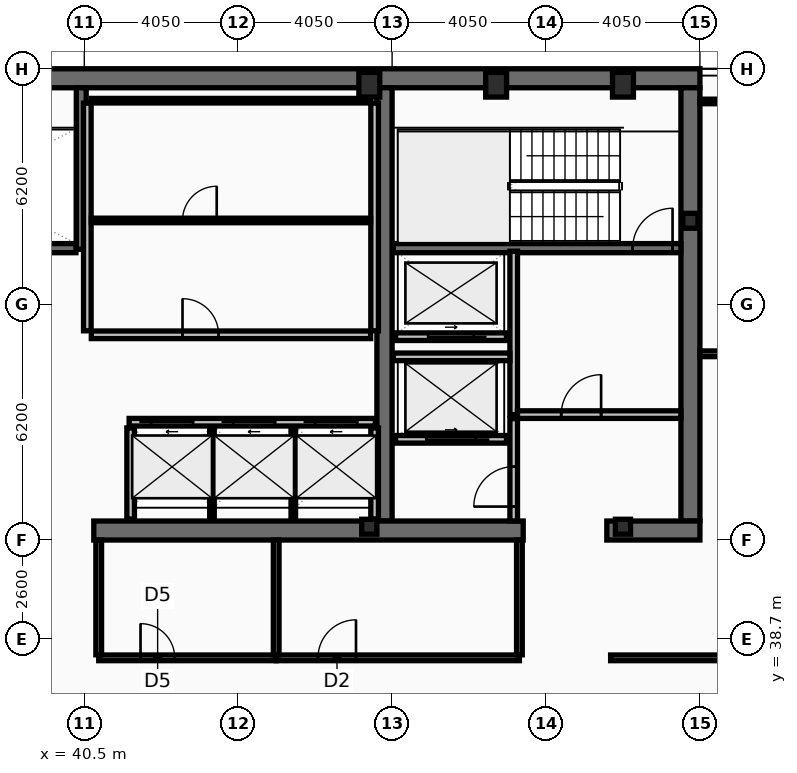
"""IFC4 building model, lengths in metres.
Left out: names, types, materials, properties, quantities, classifications, styles, units other than length and angle.
Written with IfcOpenShell. Run it as: python <this file> out.ifc"""

import sys

from ifc_helpers import new_model, si_unit, direction, frame, frame_2d, origin, origin_2d, place, context, subcontext, project, spatial, rectangle, hollow_rectangle, i_section, extrude, element, fill, save


model = new_model("IFC4")
c1 = context("Model", 3, precision=1e-05, world=origin(), true_north=direction((0.0, 1.0)))
c2 = subcontext(c1, "Body", "Model", "MODEL_VIEW")
j1 = project(units=[si_unit("LENGTHUNIT", "METRE"), si_unit("PLANEANGLEUNIT", "RADIAN")], contexts=[c1])
p1 = place(None, origin())
s1 = spatial("IfcSite", under=j1, at=p1, CompositionType="ELEMENT")
p2 = place(p1, origin())
s2 = spatial("IfcBuilding", under=s1, at=p2, CompositionType="ELEMENT")
p3 = place(p2, frame((0.0, 0.0, 347.0)))
s3 = spatial("IfcBuildingStorey", under=s2, at=p3, CompositionType="ELEMENT", Elevation=347.0)
p4 = place(p3, frame((16.2, 53.45, 0.0), z_axis=(0.0, 0.0, 1.0), x_axis=(1.0, 0.0, 0.0)))
e1 = element("IfcWall", 1, at=p4, inside=s3, PredefinedType="SHEAR", context=c2, shape_type="SweptSolid", body=[
    extrude(rectangle(XDim=40.5, YDim=0.5, at=frame_2d((20.25, 0.0))), origin(), (0.0, 0.0, 1.0), 3.38),
])
p5 = place(p3, frame((56.45, 53.2, 0.0), z_axis=(0.0, 0.0, 1.0), x_axis=(0.0, -1.0, 0.0)))
e2 = element("IfcWall", 2, at=p5, inside=s3, PredefinedType="SHEAR", context=c2, shape_type="SweptSolid", body=[
    extrude(rectangle(XDim=11.4, YDim=0.5, at=frame_2d((5.7, 0.0))), origin(), (0.0, 0.0, 1.0), 3.38),
])
p6 = place(p3, frame((48.4, 41.8, 0.0), z_axis=(0.0, 0.0, 1.0), x_axis=(0.0, 1.0, 0.0)))
e3 = element("IfcWall", 3, at=p6, inside=s3, PredefinedType="SHEAR", context=c2, shape_type="SweptSolid", body=[
    extrude(rectangle(XDim=11.4, YDim=0.4, at=frame_2d((5.7, 0.0))), origin(), (0.0, 0.0, 1.0), 3.38),
])
p7 = place(p3, frame((52.05, 41.55, 0.0), z_axis=(0.0, 0.0, 1.0), x_axis=(-1.0, 0.0, 0.0)))
e4 = element("IfcWall", 4, at=p7, inside=s3, PredefinedType="SHEAR", context=c2, shape_type="SweptSolid", body=[
    extrude(rectangle(XDim=11.3, YDim=0.5, at=frame_2d((5.65, 0.0))), origin(), (0.0, 0.0, 1.0), 3.38),
])
p8 = place(p3, frame((56.7, 41.55, 0.0), z_axis=(0.0, 0.0, 1.0), x_axis=(-1.0, 0.0, 0.0)))
e5 = element("IfcWall", 5, at=p8, inside=s3, PredefinedType="SHEAR", context=c2, shape_type="SweptSolid", body=[
    extrude(rectangle(XDim=2.45, YDim=0.5, at=frame_2d((1.225, 0.0))), origin(), (0.0, 0.0, 1.0), 3.38),
])
p9 = place(p3, frame((40.42, 48.95, 0.0), z_axis=(0.0, 0.0, 1.0), x_axis=(0.0, 1.0, 0.0)))
e6 = element("IfcWall", 6, at=p9, inside=s3, PredefinedType="SHEAR", context=c2, shape_type="SweptSolid", body=[
    extrude(rectangle(XDim=4.25, YDim=0.26, at=frame_2d((2.125, 0.0))), origin(), (0.0, 0.0, 1.0), 3.38),
])
p10 = place(p3, frame((48.63, 48.98, 0.0), z_axis=(0.0, 0.0, 1.0), x_axis=(1.0, 0.0, 0.0)))
e7 = element("IfcWall", 7, at=p10, inside=s3, PredefinedType="SHEAR", context=c2, shape_type="SweptSolid", body=[
    extrude(rectangle(XDim=7.57, YDim=0.24, at=frame_2d((3.785, 0.0))), origin(), (0.0, 0.0, 1.0), 3.38),
])
p11 = place(p10, frame((6.3, 0.0, 0.0)))
e8 = element("IfcOpeningElement", 8, at=p11, cuts=e7, PredefinedType="OPENING", context=c2, shape_type="SweptSolid", body=[
    extrude(rectangle(XDim=1.05, YDim=2.15, at=frame_2d((0.525, 1.075))), frame((0.0, 0.13, 0.0), z_axis=(0.0, -1.0, 0.0), x_axis=(1.0, 0.0, 0.0)), (0.0, 0.0, 1.0), 0.26),
])
p12 = place(p3, frame((32.72, 48.98, 0.0), z_axis=(0.0, 0.0, 1.0), x_axis=(1.0, 0.0, 0.0)))
e9 = element("IfcWall", 9, at=p12, inside=s3, PredefinedType="SHEAR", context=c2, shape_type="SweptSolid", body=[
    extrude(rectangle(XDim=7.56, YDim=0.24, at=frame_2d((3.78, 0.0))), origin(), (0.0, 0.0, 1.0), 3.38),
])
p13 = place(p12, frame((0.22, 0.0, 0.0)))
e10 = element("IfcOpeningElement", 10, at=p13, cuts=e9, PredefinedType="OPENING", context=c2, shape_type="SweptSolid", body=[
    extrude(rectangle(XDim=1.05, YDim=2.15, at=frame_2d((0.525, 1.075))), frame((0.0, 0.13, 0.0), z_axis=(0.0, -1.0, 0.0), x_axis=(1.0, 0.0, 0.0)), (0.0, 0.0, 1.0), 0.26),
])
for number, where, z_axis, x_axis in (
    (11, (48.0, 53.28, 0.0), (0.0, 0.0, 1.0), (1.0, 0.0, 0.0)),
    (12, (51.337, 53.28, 0.0), (0.0, 0.0, 1.0), (1.0, 0.0, 0.0)),
    (13, (54.675, 53.28, 0.0), (0.0, 0.0, 1.0), (1.0, 0.0, 0.0)),
):
    element("IfcColumn", number, at=place(p3, frame(where, z_axis=z_axis, x_axis=x_axis)), inside=s3, PredefinedType="COLUMN", context=c2, shape_type="SweptSolid", body=[
        extrude(hollow_rectangle(XDim=0.55, YDim=0.65, WallThickness=0.04, at=origin_2d()), origin(), (0.0, 0.0, 1.0), 3.6),
    ])
for number, where, z_axis, x_axis in (
    (14, (56.45, 49.7, 0.0), (0.0, 0.0, 1.0), (1.0, 0.0, 0.0)),
    (15, (48.0, 41.65, 0.0), (0.0, 0.0, 1.0), (1.0, 0.0, 0.0)),
    (16, (54.675, 41.65, 0.0), (0.0, 0.0, 1.0), (1.0, 0.0, 0.0)),
):
    element("IfcColumn", number, at=place(p3, frame(where, z_axis=z_axis, x_axis=x_axis)), inside=s3, PredefinedType="COLUMN", context=c2, shape_type="SweptSolid", body=[
        extrude(i_section(OverallWidth=0.399, OverallDepth=0.393, WebThickness=0.023, FlangeThickness=0.037, at=origin_2d()), origin(), (0.0, 0.0, 1.0), 3.6),
    ])
p14 = place(p3, frame((41.68, 44.4, 0.0), z_axis=(0.0, 0.0, 1.0), x_axis=(1.0, 0.0, 0.0)))
e17 = element("IfcWall", 17, at=p14, inside=s3, PredefinedType="PARTITIONING", context=c2, shape_type="SweptSolid", body=[
    extrude(rectangle(XDim=6.48, YDim=0.2, at=frame_2d((3.24, 0.0))), origin(), (0.0, 0.0, 1.0), 3.38),
])
p15 = place(p14, frame((0.58, 0.0, 0.0)))
e18 = element("IfcOpeningElement", 18, at=p15, cuts=e17, PredefinedType="OPENING", context=c2, shape_type="SweptSolid", body=[
    extrude(rectangle(XDim=1.1, YDim=2.18, at=frame_2d((0.55, 1.09))), frame((0.0, 0.11, 0.0), z_axis=(0.0, -1.0, 0.0), x_axis=(1.0, 0.0, 0.0)), (0.0, 0.0, 1.0), 0.22),
])
p16 = place(p14, frame((2.74, 0.0, 0.0)))
e19 = element("IfcOpeningElement", 19, at=p16, cuts=e17, PredefinedType="OPENING", context=c2, shape_type="SweptSolid", body=[
    extrude(rectangle(XDim=1.1, YDim=2.18, at=frame_2d((0.55, 1.09))), frame((0.0, 0.11, 0.0), z_axis=(0.0, -1.0, 0.0), x_axis=(1.0, 0.0, 0.0)), (0.0, 0.0, 1.0), 0.22),
])
p17 = place(p14, frame((4.9, 0.0, 0.0)))
e20 = element("IfcOpeningElement", 20, at=p17, cuts=e17, PredefinedType="OPENING", context=c2, shape_type="SweptSolid", body=[
    extrude(rectangle(XDim=1.1, YDim=2.18, at=frame_2d((0.55, 1.09))), frame((0.0, 0.11, 0.0), z_axis=(0.0, -1.0, 0.0), x_axis=(1.0, 0.0, 0.0)), (0.0, 0.0, 1.0), 0.22),
])
p18 = place(p3, frame((51.61, 43.95, 0.0), z_axis=(0.0, 0.0, 1.0), x_axis=(-1.0, 0.0, 0.0)))
e21 = element("IfcWall", 21, at=p18, inside=s3, PredefinedType="PARTITIONING", context=c2, shape_type="SweptSolid", body=[
    extrude(rectangle(XDim=2.92, YDim=0.2, at=frame_2d((1.46, 0.0))), origin(), (0.0, 0.0, 1.0), 3.38),
])
p19 = place(p18, frame((0.81, 0.0, 0.0)))
e22 = element("IfcOpeningElement", 22, at=p19, cuts=e21, PredefinedType="OPENING", context=c2, shape_type="SweptSolid", body=[
    extrude(rectangle(XDim=1.3, YDim=2.18, at=frame_2d((0.65, 1.09))), frame((0.0, 0.11, 0.0), z_axis=(0.0, -1.0, 0.0), x_axis=(1.0, 0.0, 0.0)), (0.0, 0.0, 1.0), 0.22),
])
p20 = place(p3, frame((51.61, 46.65, 0.0), z_axis=(0.0, 0.0, 1.0), x_axis=(-1.0, 0.0, 0.0)))
e23 = element("IfcWall", 23, at=p20, inside=s3, PredefinedType="PARTITIONING", context=c2, shape_type="SweptSolid", body=[
    extrude(rectangle(XDim=2.92, YDim=0.2, at=frame_2d((1.46, 0.0))), origin(), (0.0, 0.0, 1.0), 3.38),
])
p21 = place(p20, frame((0.86, 0.0, 0.0)))
e24 = element("IfcOpeningElement", 24, at=p21, cuts=e23, PredefinedType="OPENING", context=c2, shape_type="SweptSolid", body=[
    extrude(rectangle(XDim=1.2, YDim=2.18, at=frame_2d((0.6, 1.09))), frame((0.0, 0.11, 0.0), z_axis=(0.0, -1.0, 0.0), x_axis=(1.0, 0.0, 0.0)), (0.0, 0.0, 1.0), 0.22),
])
p22 = place(p3, frame((51.8, 44.6, 0.0), z_axis=(0.0, 0.0, 1.0), x_axis=(0.0, 1.0, 0.0)))
e25 = element("IfcWall", 25, at=p22, inside=s3, PredefinedType="PARTITIONING", context=c2, shape_type="SweptSolid", body=[
    extrude(rectangle(XDim=4.3, YDim=0.2, at=frame_2d((2.15, 0.0))), origin(), (0.0, 0.0, 1.0), 3.38),
])
p23 = place(p3, frame((51.9, 44.6, 0.0), z_axis=(0.0, 0.0, 1.0), x_axis=(1.0, 0.0, 0.0)))
e26 = element("IfcWall", 26, at=p23, inside=s3, PredefinedType="PARTITIONING", context=c2, shape_type="SweptSolid", body=[
    extrude(rectangle(XDim=4.3, YDim=0.2, at=frame_2d((2.15, 0.0))), origin(), (0.0, 0.0, 1.0), 3.38),
])
p24 = place(p23, frame((1.15, 0.0, 0.0)))
e27 = element("IfcOpeningElement", 27, at=p24, cuts=e26, PredefinedType="OPENING", context=c2, shape_type="SweptSolid", body=[
    extrude(rectangle(XDim=1.05, YDim=2.15, at=frame_2d((0.525, 1.075))), frame((0.0, 0.11, 0.0), z_axis=(0.0, -1.0, 0.0), x_axis=(1.0, 0.0, 0.0)), (0.0, 0.0, 1.0), 0.22),
])
p25 = place(p3, frame((48.63, 46.12, 0.0), z_axis=(0.0, 0.0, 1.0), x_axis=(1.0, 0.0, 0.0)))
e28 = element("IfcWall", 28, at=p25, inside=s3, PredefinedType="PARTITIONING", context=c2, shape_type="SweptSolid", body=[
    extrude(rectangle(XDim=3.07, YDim=0.2, at=frame_2d((1.535, 0.0))), origin(), (0.0, 0.0, 1.0), 3.38),
])
p26 = place(p3, frame((51.8, 41.8, 0.0), z_axis=(0.0, 0.0, 1.0), x_axis=(0.0, 1.0, 0.0)))
e29 = element("IfcWall", 29, at=p26, inside=s3, PredefinedType="PARTITIONING", context=c2, shape_type="SweptSolid", body=[
    extrude(rectangle(XDim=2.695, YDim=0.2, at=frame_2d((1.348, 0.0))), origin(), (0.0, 0.0, 1.0), 3.38),
])
p27 = place(p26, frame((0.38, 0.0, 0.0)))
e30 = element("IfcOpeningElement", 30, at=p27, cuts=e29, PredefinedType="OPENING", context=c2, shape_type="SweptSolid", body=[
    extrude(rectangle(XDim=1.05, YDim=2.15, at=frame_2d((0.525, 1.075))), frame((0.0, 0.11, 0.0), z_axis=(0.0, -1.0, 0.0), x_axis=(1.0, 0.0, 0.0)), (0.0, 0.0, 1.0), 0.22),
])
for number, where, z_axis, x_axis in (
    (31, (40.58, 46.805, 0.0), (0.0, 0.0, 1.0), (0.0, 1.0, 0.0)),
    (32, (48.14, 46.805, 0.0), (0.0, 0.0, 1.0), (0.0, 1.0, 0.0)),
):
    element("IfcWall", number, at=place(p3, frame(where, z_axis=z_axis, x_axis=x_axis)), inside=s3, PredefinedType="PARTITIONING", context=c2, shape_type="SweptSolid", body=[
        extrude(rectangle(XDim=5.99, YDim=0.2, at=frame_2d((2.995, 0.0))), origin(), (0.0, 0.0, 1.0), 3.38),
    ])
p28 = place(p3, frame((40.685, 52.86, 0.0), z_axis=(0.0, 0.0, 1.0), x_axis=(1.0, 0.0, 0.0)))
e33 = element("IfcWall", 33, at=p28, inside=s3, PredefinedType="PARTITIONING", context=c2, shape_type="SweptSolid", body=[
    extrude(rectangle(XDim=7.35, YDim=0.12, at=frame_2d((3.675, 0.0))), origin(), (0.0, 0.0, 1.0), 3.38),
])
p29 = place(p3, frame((40.685, 49.709, 0.0), z_axis=(0.0, 0.0, 1.0), x_axis=(1.0, 0.0, 0.0)))
e34 = element("IfcWall", 34, at=p29, inside=s3, PredefinedType="PARTITIONING", context=c2, shape_type="SweptSolid", body=[
    extrude(rectangle(XDim=7.35, YDim=0.12, at=frame_2d((3.675, 0.0))), origin(), (0.0, 0.0, 1.0), 3.38),
])
p30 = place(p29, frame((2.4, 0.0, 0.0)))
e35 = element("IfcOpeningElement", 35, at=p30, cuts=e34, PredefinedType="OPENING", context=c2, shape_type="SweptSolid", body=[
    extrude(rectangle(XDim=0.9, YDim=2.05, at=frame_2d((0.45, 1.025))), frame((0.0, 0.07, 0.0), z_axis=(0.0, -1.0, 0.0), x_axis=(1.0, 0.0, 0.0)), (0.0, 0.0, 1.0), 0.14),
])
p31 = place(p3, frame((40.685, 46.7, 0.0), z_axis=(0.0, 0.0, 1.0), x_axis=(1.0, 0.0, 0.0)))
e36 = element("IfcWall", 36, at=p31, inside=s3, PredefinedType="PARTITIONING", context=c2, shape_type="SweptSolid", body=[
    extrude(rectangle(XDim=7.35, YDim=0.2, at=frame_2d((3.675, 0.0))), origin(), (0.0, 0.0, 1.0), 3.38),
])
p32 = place(p31, frame((2.4, 0.0, 0.0)))
e37 = element("IfcOpeningElement", 37, at=p32, cuts=e36, PredefinedType="OPENING", context=c2, shape_type="SweptSolid", body=[
    extrude(rectangle(XDim=0.95, YDim=2.1, at=frame_2d((0.475, 1.05))), frame((0.0, 0.11, 0.0), z_axis=(0.0, -1.0, 0.0), x_axis=(1.0, 0.0, 0.0)), (0.0, 0.0, 1.0), 0.22),
])
for number, where, z_axis, x_axis in (
    (38, (41.72, 41.85, 0.0), (0.0, 0.0, 1.0), (0.0, 1.0, 0.0)),
    (39, (48.14, 41.85, 0.0), (0.0, 0.0, 1.0), (0.0, 1.0, 0.0)),
):
    element("IfcWall", number, at=place(p3, frame(where, z_axis=z_axis, x_axis=x_axis)), inside=s3, PredefinedType="PARTITIONING", context=c2, shape_type="SweptSolid", body=[
        extrude(rectangle(XDim=2.4, YDim=0.2, at=frame_2d((1.2, 0.0))), origin(), (0.0, 0.0, 1.0), 3.38),
    ])
for number, where, z_axis, x_axis in (
    (40, (43.86, 41.85, 0.0), (0.0, 0.0, 1.0), (0.0, 1.0, 0.0)),
    (41, (46.0, 41.85, 0.0), (0.0, 0.0, 1.0), (0.0, 1.0, 0.0)),
):
    element("IfcWall", number, at=place(p3, frame(where, z_axis=z_axis, x_axis=x_axis)), inside=s3, PredefinedType="PARTITIONING", context=c2, shape_type="SweptSolid", body=[
        extrude(rectangle(XDim=2.4, YDim=0.12, at=frame_2d((1.2, 0.0))), origin(), (0.0, 0.0, 1.0), 3.38),
    ])
p33 = place(p3, frame((40.88, 38.2, 0.0), z_axis=(0.0, 0.0, 1.0), x_axis=(1.0, 0.0, 0.0)))
e42 = element("IfcWall", 42, at=p33, inside=s3, PredefinedType="PARTITIONING", context=c2, shape_type="SweptSolid", body=[
    extrude(rectangle(XDim=4.67, YDim=0.15, at=frame_2d((2.335, 0.0))), origin(), (0.0, 0.0, 1.0), 3.38),
])
p34 = place(p33, frame((1.1, 0.0, 0.0)))
e43 = element("IfcOpeningElement", 43, at=p34, cuts=e42, PredefinedType="OPENING", context=c2, shape_type="SweptSolid", body=[
    extrude(rectangle(XDim=0.9, YDim=2.05, at=frame_2d((0.45, 1.025))), frame((0.0, 0.085, 0.0), z_axis=(0.0, -1.0, 0.0), x_axis=(1.0, 0.0, 0.0)), (0.0, 0.0, 1.0), 0.17),
])
p35 = place(p3, frame((45.55, 38.2, 0.0), z_axis=(0.0, 0.0, 1.0), x_axis=(1.0, 0.0, 0.0)))
e44 = element("IfcWall", 44, at=p35, inside=s3, PredefinedType="PARTITIONING", context=c2, shape_type="SweptSolid", body=[
    extrude(rectangle(XDim=6.4, YDim=0.15, at=frame_2d((3.2, 0.0))), origin(), (0.0, 0.0, 1.0), 2.77),
])
p36 = place(p35, frame((1.1, 0.0, 0.0)))
e45 = element("IfcOpeningElement", 45, at=p36, cuts=e44, PredefinedType="OPENING", context=c2, shape_type="SweptSolid", body=[
    extrude(rectangle(XDim=1.0, YDim=2.05, at=frame_2d((0.5, 1.025))), frame((0.0, 0.085, 0.0), z_axis=(0.0, -1.0, 0.0), x_axis=(1.0, 0.0, 0.0)), (0.0, 0.0, 1.0), 0.17),
])
for number, where, z_axis, x_axis in (
    (46, (40.88, 38.28, 0.0), (0.0, 0.0, 1.0), (0.0, 1.0, 0.0)),
    (47, (45.55, 38.28, 0.0), (0.0, 0.0, 1.0), (0.0, 1.0, 0.0)),
    (48, (51.95, 38.28, 0.0), (0.0, 0.0, 1.0), (0.0, 1.0, 0.0)),
):
    element("IfcWall", number, at=place(p3, frame(where, z_axis=z_axis, x_axis=x_axis)), inside=s3, PredefinedType="PARTITIONING", context=c2, shape_type="SweptSolid", body=[
        extrude(rectangle(XDim=3.02, YDim=0.15, at=frame_2d((1.51, 0.0))), origin(), (0.0, 0.0, 1.0), 3.38),
    ])
p37 = place(p3, frame((54.35, 38.2, 0.0), z_axis=(0.0, 0.0, 1.0), x_axis=(1.0, 0.0, 0.0)))
e49 = element("IfcWall", 49, at=p37, inside=s3, PredefinedType="PARTITIONING", context=c2, shape_type="SweptSolid", body=[
    extrude(rectangle(XDim=6.52, YDim=0.15, at=frame_2d((3.26, 0.0))), origin(), (0.0, 0.0, 1.0), 2.77),
])
p38 = place(p37, frame((3.25, 0.0, 0.0)))
e50 = element("IfcOpeningElement", 50, at=p38, cuts=e49, PredefinedType="OPENING", context=c2, shape_type="SweptSolid", body=[
    extrude(rectangle(XDim=0.95, YDim=2.05, at=frame_2d((0.475, 1.025))), frame((0.0, 0.085, 0.0), z_axis=(0.0, -1.0, 0.0), x_axis=(1.0, 0.0, 0.0)), (0.0, 0.0, 1.0), 0.17),
])
p39 = place(p3, frame((56.7, 46.2, 0.0), z_axis=(0.0, 0.0, 1.0), x_axis=(1.0, 0.0, 0.0)))
e51 = element("IfcWall", 51, at=p39, inside=s3, PredefinedType="PARTITIONING", context=c2, shape_type="SweptSolid", body=[
    extrude(rectangle(XDim=4.105, YDim=0.15, at=frame_2d((2.052, 0.0))), origin(), (0.0, 0.0, 1.0), 2.82),
])
p40 = place(p39, frame((0.9, 0.0, 0.0)))
e52 = element("IfcOpeningElement", 52, at=p40, cuts=e51, PredefinedType="OPENING", context=c2, shape_type="SweptSolid", body=[
    extrude(rectangle(XDim=0.9, YDim=2.05, at=frame_2d((0.45, 1.025))), frame((0.0, 0.085, 0.0), z_axis=(0.0, -1.0, 0.0), x_axis=(1.0, 0.0, 0.0)), (0.0, 0.0, 1.0), 0.17),
])
p41 = place(p3, frame((56.7, 52.84, 0.0), z_axis=(0.0, 0.0, 1.0), x_axis=(1.0, 0.0, 0.0)))
e53 = element("IfcWall", 53, at=p41, inside=s3, PredefinedType="PARTITIONING", context=c2, shape_type="SweptSolid", body=[
    extrude(rectangle(XDim=4.105, YDim=0.12, at=frame_2d((2.052, 0.0))), origin(), (0.0, 0.0, 1.0), 3.38),
])
p42 = place(p11, origin())
e54 = element("IfcDoor", 54, at=p42, inside=s3, OperationType="SINGLE_SWING_RIGHT", PredefinedType="DOOR", context=c2, shape_type="SweptSolid", body=[
    extrude(rectangle(XDim=1.05, YDim=2.15, at=frame_2d((0.525, 1.075))), frame((0.0, 0.025, 0.0), z_axis=(0.0, -1.0, 0.0), x_axis=(1.0, 0.0, 0.0)), (0.0, 0.0, 1.0), 0.05),
])
fill(e8, e54)
p43 = place(p15, origin())
e55 = element("IfcDoor", 55, at=p43, inside=s3, OperationType="SLIDING_TO_LEFT", PredefinedType="DOOR", context=c2, shape_type="SweptSolid", body=[
    extrude(rectangle(XDim=1.1, YDim=2.18, at=frame_2d((0.55, 1.09))), frame((0.0, 0.025, 0.0), z_axis=(0.0, -1.0, 0.0), x_axis=(1.0, 0.0, 0.0)), (0.0, 0.0, 1.0), 0.05),
])
fill(e18, e55)
p44 = place(p16, origin())
e56 = element("IfcDoor", 56, at=p44, inside=s3, OperationType="SLIDING_TO_LEFT", PredefinedType="DOOR", context=c2, shape_type="SweptSolid", body=[
    extrude(rectangle(XDim=1.1, YDim=2.18, at=frame_2d((0.55, 1.09))), frame((0.0, 0.025, 0.0), z_axis=(0.0, -1.0, 0.0), x_axis=(1.0, 0.0, 0.0)), (0.0, 0.0, 1.0), 0.05),
])
fill(e19, e56)
p45 = place(p17, origin())
e57 = element("IfcDoor", 57, at=p45, inside=s3, OperationType="SLIDING_TO_LEFT", PredefinedType="DOOR", context=c2, shape_type="SweptSolid", body=[
    extrude(rectangle(XDim=1.1, YDim=2.18, at=frame_2d((0.55, 1.09))), frame((0.0, 0.025, 0.0), z_axis=(0.0, -1.0, 0.0), x_axis=(1.0, 0.0, 0.0)), (0.0, 0.0, 1.0), 0.05),
])
fill(e20, e57)
p46 = place(p19, origin())
e58 = element("IfcDoor", 58, at=p46, inside=s3, OperationType="SLIDING_TO_LEFT", PredefinedType="DOOR", context=c2, shape_type="SweptSolid", body=[
    extrude(rectangle(XDim=1.3, YDim=2.18, at=frame_2d((0.65, 1.09))), frame((0.0, 0.025, 0.0), z_axis=(0.0, -1.0, 0.0), x_axis=(1.0, 0.0, 0.0)), (0.0, 0.0, 1.0), 0.05),
])
fill(e22, e58)
p47 = place(p21, origin())
e59 = element("IfcDoor", 59, at=p47, inside=s3, OperationType="SLIDING_TO_LEFT", PredefinedType="DOOR", context=c2, shape_type="SweptSolid", body=[
    extrude(rectangle(XDim=1.2, YDim=2.18, at=frame_2d((0.6, 1.09))), frame((0.0, 0.025, 0.0), z_axis=(0.0, -1.0, 0.0), x_axis=(1.0, 0.0, 0.0)), (0.0, 0.0, 1.0), 0.05),
])
fill(e24, e59)
p48 = place(p24, origin())
e60 = element("IfcDoor", 60, at=p48, inside=s3, OperationType="SINGLE_SWING_RIGHT", PredefinedType="DOOR", context=c2, shape_type="SweptSolid", body=[
    extrude(rectangle(XDim=1.05, YDim=2.15, at=frame_2d((0.525, 1.075))), frame((0.0, 0.025, 0.0), z_axis=(0.0, -1.0, 0.0), x_axis=(1.0, 0.0, 0.0)), (0.0, 0.0, 1.0), 0.05),
])
fill(e27, e60)
p49 = place(p27, origin())
e61 = element("IfcDoor", 61, at=p49, inside=s3, OperationType="SINGLE_SWING_LEFT", PredefinedType="DOOR", context=c2, shape_type="SweptSolid", body=[
    extrude(rectangle(XDim=1.05, YDim=2.15, at=frame_2d((0.525, 1.075))), frame((0.0, 0.025, 0.0), z_axis=(0.0, -1.0, 0.0), x_axis=(1.0, 0.0, 0.0)), (0.0, 0.0, 1.0), 0.05),
])
fill(e30, e61)
p50 = place(p30, origin())
e62 = element("IfcDoor", 62, at=p50, inside=s3, OperationType="SINGLE_SWING_RIGHT", PredefinedType="DOOR", context=c2, shape_type="SweptSolid", body=[
    extrude(rectangle(XDim=0.9, YDim=2.05, at=frame_2d((0.45, 1.025))), frame((0.0, 0.025, 0.0), z_axis=(0.0, -1.0, 0.0), x_axis=(1.0, 0.0, 0.0)), (0.0, 0.0, 1.0), 0.05),
])
fill(e35, e62)
p51 = place(p32, origin())
e63 = element("IfcDoor", 63, at=p51, inside=s3, OperationType="SINGLE_SWING_LEFT", PredefinedType="DOOR", context=c2, shape_type="SweptSolid", body=[
    extrude(rectangle(XDim=0.95, YDim=2.1, at=frame_2d((0.475, 1.05))), frame((0.0, 0.025, 0.0), z_axis=(0.0, -1.0, 0.0), x_axis=(1.0, 0.0, 0.0)), (0.0, 0.0, 1.0), 0.05),
])
fill(e37, e63)
p52 = place(p34, origin())
e64 = element("IfcDoor", 64, at=p52, inside=s3, OperationType="SINGLE_SWING_LEFT", PredefinedType="DOOR", context=c2, shape_type="SweptSolid", body=[
    extrude(rectangle(XDim=0.9, YDim=2.05, at=frame_2d((0.45, 1.025))), frame((0.0, 0.025, 0.0), z_axis=(0.0, -1.0, 0.0), x_axis=(1.0, 0.0, 0.0)), (0.0, 0.0, 1.0), 0.05),
])
fill(e43, e64)
p53 = place(p36, origin())
e65 = element("IfcDoor", 65, at=p53, inside=s3, OperationType="SINGLE_SWING_RIGHT", PredefinedType="DOOR", context=c2, shape_type="SweptSolid", body=[
    extrude(rectangle(XDim=1.0, YDim=2.05, at=frame_2d((0.5, 1.025))), frame((0.0, 0.025, 0.0), z_axis=(0.0, -1.0, 0.0), x_axis=(1.0, 0.0, 0.0)), (0.0, 0.0, 1.0), 0.05),
])
fill(e45, e65)
save(model, sys.argv[1])
